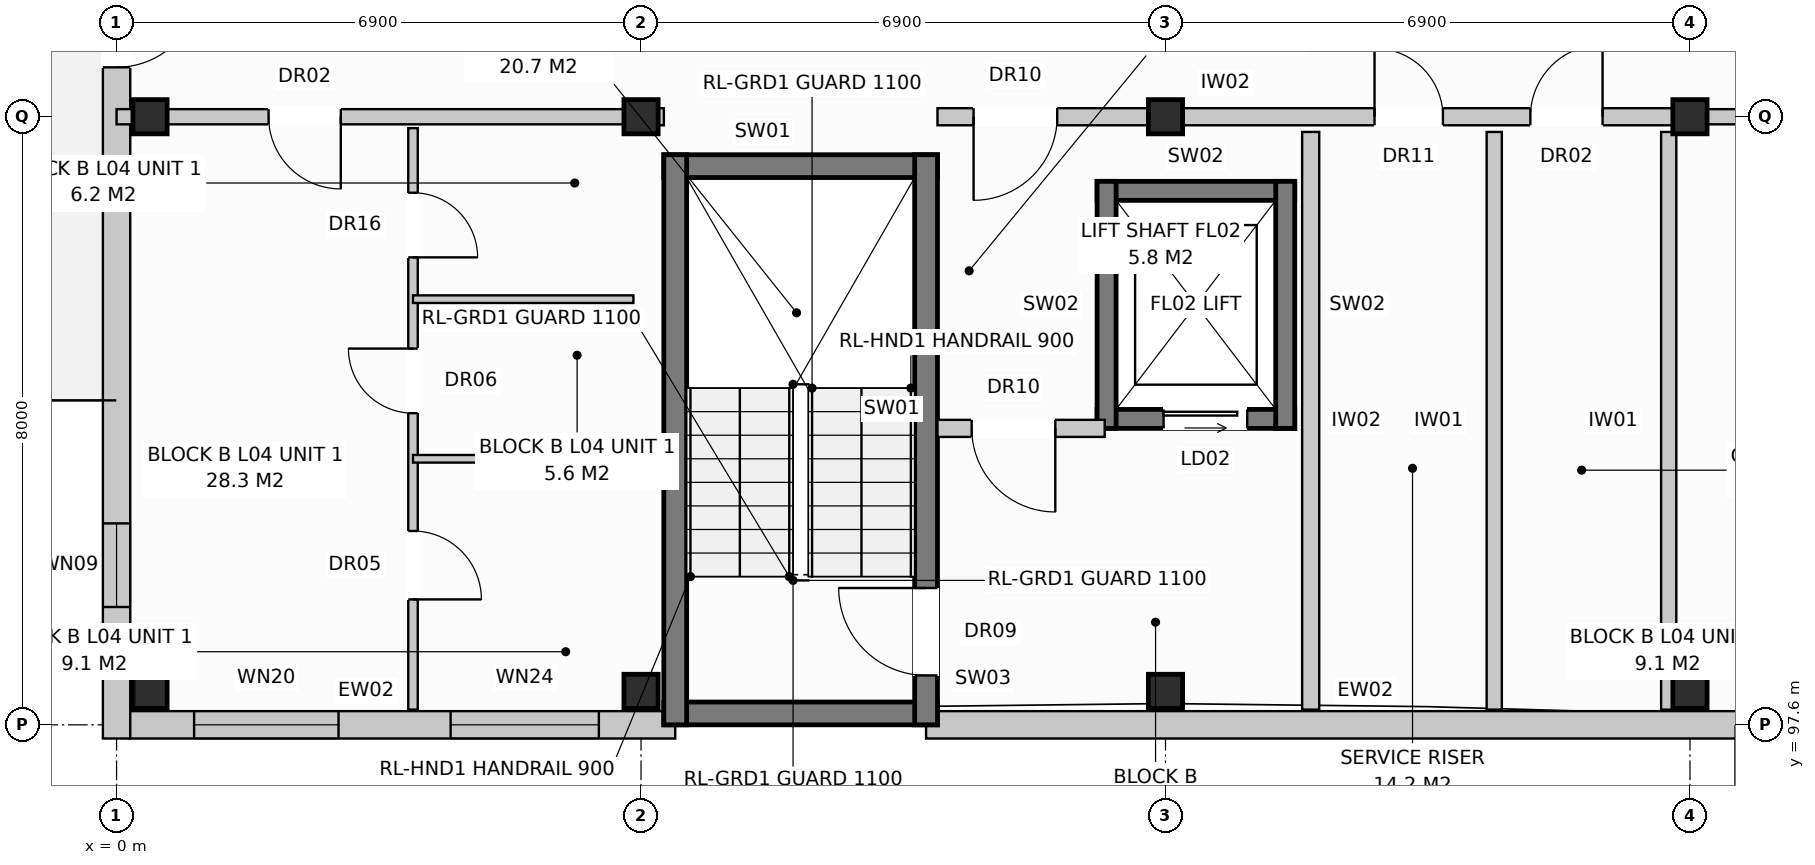
"""IFC4 building model, lengths in metres.
Left out: names, types, materials, properties, quantities, classifications, styles, units other than length and angle.
Written with IfcOpenShell. Run it as: python <this file> out.ifc"""

import sys

from ifc_helpers import new_model, si_unit, direction, frame, frame_2d, origin, origin_with_axes, origin_2d, place, context, subcontext, project, spatial, rectangle, extrude, element, fill, save


model = new_model("IFC4")
c1 = context("Model", 3, precision=1e-05, world=origin(), true_north=direction((0.0, 1.0)))
c2 = subcontext(c1, "Body", "Model", "MODEL_VIEW")
j1 = project(units=[si_unit("LENGTHUNIT", "METRE"), si_unit("PLANEANGLEUNIT", "RADIAN")], contexts=[c1])
p1 = place(None, origin())
s1 = spatial("IfcSite", under=j1, at=p1, CompositionType="ELEMENT")
p2 = place(p1, origin())
s2 = spatial("IfcBuilding", under=s1, at=p2, CompositionType="ELEMENT")
p3 = place(p2, frame((0.0, 0.0, 14.4)))
s3 = spatial("IfcBuildingStorey", under=s2, at=p3, CompositionType="ELEMENT", Elevation=14.4)
for number, where, z_axis, x_axis in (
    (1, (0.44, 98.04, 0.0), (0.0, 0.0, 1.0), (1.0, 0.0, 0.0)),
    (2, (0.44, 105.6, 0.0), (0.0, 0.0, 1.0), (1.0, 0.0, 0.0)),
    (3, (6.9, 98.04, 0.0), (0.0, 0.0, 1.0), (1.0, 0.0, 0.0)),
    (4, (6.9, 105.6, 0.0), (0.0, 0.0, 1.0), (1.0, 0.0, 0.0)),
    (5, (13.8, 98.04, 0.0), (0.0, 0.0, 1.0), (1.0, 0.0, 0.0)),
    (6, (13.8, 105.6, 0.0), (0.0, 0.0, 1.0), (1.0, 0.0, 0.0)),
    (7, (20.7, 98.04, 0.0), (0.0, 0.0, 1.0), (1.0, 0.0, 0.0)),
    (8, (20.7, 105.6, 0.0), (0.0, 0.0, 1.0), (1.0, 0.0, 0.0)),
):
    element("IfcColumn", number, at=place(p3, frame(where, z_axis=z_axis, x_axis=x_axis)), inside=s3, PredefinedType="COLUMN", context=c2, shape_type="SweptSolid", body=[
        extrude(rectangle(XDim=0.45, YDim=0.45, at=origin_2d()), origin(), (0.0, 0.0, 1.0), 3.2),
    ])
p4 = place(p3, frame((0.17, 97.6, 0.0), z_axis=(0.0, 0.0, 1.0), x_axis=(1.0, 0.0, 0.0)))
e9 = element("IfcWall", 9, at=p4, inside=s3, PredefinedType="STANDARD", context=c2, shape_type="SweptSolid", body=[
    extrude(rectangle(XDim=7.18, YDim=0.36, at=frame_2d((3.59, 0.0))), origin(), (0.0, 0.0, 1.0), 2.94),
])
p5 = place(p4, frame((0.85, 0.0, 0.8)))
e10 = element("IfcOpeningElement", 10, at=p5, cuts=e9, PredefinedType="OPENING", context=c2, shape_type="SweptSolid", body=[
    extrude(rectangle(XDim=1.9, YDim=1.85, at=frame_2d((0.95, 0.925))), frame((0.0, 0.192, 0.0), z_axis=(0.0, -1.0, 0.0), x_axis=(1.0, 0.0, 0.0)), (0.0, 0.0, 1.0), 0.384),
])
p6 = place(p4, frame((4.225, 0.0, 0.8)))
e11 = element("IfcOpeningElement", 11, at=p6, cuts=e9, PredefinedType="OPENING", context=c2, shape_type="SweptSolid", body=[
    extrude(rectangle(XDim=1.95, YDim=1.65, at=frame_2d((0.975, 0.825))), frame((0.0, 0.192, 0.0), z_axis=(0.0, -1.0, 0.0), x_axis=(1.0, 0.0, 0.0)), (0.0, 0.0, 1.0), 0.384),
])
p7 = place(p3, frame((10.65, 97.6, 0.0), z_axis=(0.0, 0.0, 1.0), x_axis=(1.0, 0.0, 0.0)))
e12 = element("IfcWall", 12, at=p7, inside=s3, PredefinedType="STANDARD", context=c2, shape_type="SweptSolid", body=[
    extrude(rectangle(XDim=17.4, YDim=0.36, at=frame_2d((8.7, 0.0))), origin(), (0.0, 0.0, 1.0), 2.94),
])
p8 = place(p7, frame((11.87, 0.0, 0.0)))
e13 = element("IfcOpeningElement", 13, at=p8, cuts=e12, PredefinedType="OPENING", context=c2, shape_type="SweptSolid", body=[
    extrude(rectangle(XDim=0.95, YDim=2.1, at=frame_2d((0.475, 1.05))), frame((0.0, 0.192, 0.0), z_axis=(0.0, -1.0, 0.0), x_axis=(1.0, 0.0, 0.0)), (0.0, 0.0, 1.0), 0.384),
])
p9 = place(p7, frame((14.87, 0.0, 0.72)))
e14 = element("IfcOpeningElement", 14, at=p9, cuts=e12, PredefinedType="OPENING", context=c2, shape_type="SweptSolid", body=[
    extrude(rectangle(XDim=1.1, YDim=1.5, at=frame_2d((0.55, 0.75))), frame((0.0, 0.192, 0.0), z_axis=(0.0, -1.0, 0.0), x_axis=(1.0, 0.0, 0.0)), (0.0, 0.0, 1.0), 0.384),
])
p10 = place(p3, frame((0.0, 97.42, 0.0), z_axis=(0.0, 0.0, 1.0), x_axis=(0.0, 1.0, 0.0)))
e15 = element("IfcWall", 15, at=p10, inside=s3, PredefinedType="STANDARD", context=c2, shape_type="SweptSolid", body=[
    extrude(rectangle(XDim=18.76, YDim=0.36, at=frame_2d((9.38, 0.0))), origin(), (0.0, 0.0, 1.0), 2.94),
])
p11 = place(p10, frame((8.83, 0.0, 0.0)))
e16 = element("IfcOpeningElement", 16, at=p11, cuts=e15, PredefinedType="OPENING", context=c2, shape_type="SweptSolid", body=[
    extrude(rectangle(XDim=1.1, YDim=2.1, at=frame_2d((0.55, 1.05))), frame((0.0, 0.192, 0.0), z_axis=(0.0, -1.0, 0.0), x_axis=(1.0, 0.0, 0.0)), (0.0, 0.0, 1.0), 0.384),
])
p12 = place(p10, frame((1.73, 0.0, 0.72)))
e17 = element("IfcOpeningElement", 17, at=p12, cuts=e15, PredefinedType="OPENING", context=c2, shape_type="SweptSolid", body=[
    extrude(rectangle(XDim=1.1, YDim=1.5, at=frame_2d((0.55, 0.75))), frame((0.0, 0.192, 0.0), z_axis=(0.0, -1.0, 0.0), x_axis=(1.0, 0.0, 0.0)), (0.0, 0.0, 1.0), 0.384),
])
p13 = place(p10, frame((15.93, 0.0, 0.72)))
e18 = element("IfcOpeningElement", 18, at=p13, cuts=e15, PredefinedType="OPENING", context=c2, shape_type="SweptSolid", body=[
    extrude(rectangle(XDim=1.1, YDim=1.5, at=frame_2d((0.55, 0.75))), frame((0.0, 0.192, 0.0), z_axis=(0.0, -1.0, 0.0), x_axis=(1.0, 0.0, 0.0)), (0.0, 0.0, 1.0), 0.384),
])
for number, where, z_axis, x_axis in (
    (19, (7.2, 97.75, 0.0), (0.0, 0.0, 1.0), (1.0, 0.0, 0.0)),
    (20, (7.2, 104.95, 0.0), (0.0, 0.0, 1.0), (1.0, 0.0, 0.0)),
):
    element("IfcWall", number, at=place(p3, frame(where, z_axis=z_axis, x_axis=x_axis)), inside=s3, PredefinedType="SHEAR", context=c2, shape_type="SweptSolid", body=[
        extrude(rectangle(XDim=3.6, YDim=0.3, at=frame_2d((1.8, 0.0))), origin(), (0.0, 0.0, 1.0), 2.94),
    ])
p14 = place(p3, frame((7.35, 97.6, 0.0), z_axis=(0.0, 0.0, 1.0), x_axis=(0.0, 1.0, 0.0)))
e21 = element("IfcWall", 21, at=p14, inside=s3, PredefinedType="SHEAR", context=c2, shape_type="SweptSolid", body=[
    extrude(rectangle(XDim=7.5, YDim=0.3, at=frame_2d((3.75, 0.0))), origin(), (0.0, 0.0, 1.0), 2.94),
])
p15 = place(p3, frame((10.65, 97.6, 0.0), z_axis=(0.0, 0.0, 1.0), x_axis=(0.0, 1.0, 0.0)))
e22 = element("IfcWall", 22, at=p15, inside=s3, PredefinedType="SHEAR", context=c2, shape_type="SweptSolid", body=[
    extrude(rectangle(XDim=7.5, YDim=0.3, at=frame_2d((3.75, 0.0))), origin(), (0.0, 0.0, 1.0), 2.94),
])
p16 = place(p15, frame((0.65, 0.0, 0.0)))
e23 = element("IfcOpeningElement", 23, at=p16, cuts=e22, PredefinedType="OPENING", context=c2, shape_type="SweptSolid", body=[
    extrude(rectangle(XDim=1.15, YDim=2.15, at=frame_2d((0.575, 1.075))), frame((0.0, 0.162, 0.0), z_axis=(0.0, -1.0, 0.0), x_axis=(1.0, 0.0, 0.0)), (0.0, 0.0, 1.0), 0.324),
])
p17 = place(p3, frame((12.9, 101.625, 0.0), z_axis=(0.0, 0.0, 1.0), x_axis=(1.0, 0.0, 0.0)))
e24 = element("IfcWall", 24, at=p17, inside=s3, PredefinedType="SHEAR", context=c2, shape_type="SweptSolid", body=[
    extrude(rectangle(XDim=2.6, YDim=0.25, at=frame_2d((1.3, 0.0))), origin(), (0.0, 0.0, 1.0), 2.94),
])
p18 = place(p17, frame((0.875, 0.0, 0.0)))
e25 = element("IfcOpeningElement", 25, at=p18, cuts=e24, PredefinedType="OPENING", context=c2, shape_type="SweptSolid", body=[
    extrude(rectangle(XDim=1.1, YDim=2.1, at=frame_2d((0.55, 1.05))), frame((0.0, 0.137, 0.0), z_axis=(0.0, -1.0, 0.0), x_axis=(1.0, 0.0, 0.0)), (0.0, 0.0, 1.0), 0.274),
])
p19 = place(p3, frame((12.9, 104.625, 0.0), z_axis=(0.0, 0.0, 1.0), x_axis=(1.0, 0.0, 0.0)))
e26 = element("IfcWall", 26, at=p19, inside=s3, PredefinedType="SHEAR", context=c2, shape_type="SweptSolid", body=[
    extrude(rectangle(XDim=2.6, YDim=0.25, at=frame_2d((1.3, 0.0))), origin(), (0.0, 0.0, 1.0), 2.94),
])
for number, where, z_axis, x_axis in (
    (27, (13.025, 101.5, 0.0), (0.0, 0.0, 1.0), (0.0, 1.0, 0.0)),
    (28, (15.375, 101.5, 0.0), (0.0, 0.0, 1.0), (0.0, 1.0, 0.0)),
):
    element("IfcWall", number, at=place(p3, frame(where, z_axis=z_axis, x_axis=x_axis)), inside=s3, PredefinedType="SHEAR", context=c2, shape_type="SweptSolid", body=[
        extrude(rectangle(XDim=3.25, YDim=0.25, at=frame_2d((1.625, 0.0))), origin(), (0.0, 0.0, 1.0), 2.94),
    ])
p20 = place(p3, frame((15.71, 97.8, 0.0), z_axis=(0.0, 0.0, 1.0), x_axis=(0.0, 1.0, 0.0)))
e29 = element("IfcWall", 29, at=p20, inside=s3, PredefinedType="PARTITIONING", context=c2, shape_type="SweptSolid", body=[
    extrude(rectangle(XDim=7.6, YDim=0.225, at=frame_2d((3.8, 0.0))), origin(), (0.0, 0.0, 1.0), 2.59),
])
p21 = place(p3, frame((10.8, 101.5, 0.0), z_axis=(0.0, 0.0, 1.0), x_axis=(1.0, 0.0, 0.0)))
e30 = element("IfcWall", 30, at=p21, inside=s3, PredefinedType="PARTITIONING", context=c2, shape_type="SweptSolid", body=[
    extrude(rectangle(XDim=2.2, YDim=0.225, at=frame_2d((1.1, 0.0))), origin(), (0.0, 0.0, 1.0), 2.94),
])
p22 = place(p21, frame((0.45, 0.0, 0.0)))
e31 = element("IfcOpeningElement", 31, at=p22, cuts=e30, PredefinedType="OPENING", context=c2, shape_type="SweptSolid", body=[
    extrude(rectangle(XDim=1.1, YDim=2.15, at=frame_2d((0.55, 1.075))), frame((0.0, 0.125, 0.0), z_axis=(0.0, -1.0, 0.0), x_axis=(1.0, 0.0, 0.0)), (0.0, 0.0, 1.0), 0.249),
])
p23 = place(p3, frame((6.9, 105.6, 0.0), z_axis=(0.0, 0.0, 1.0), x_axis=(1.0, 0.0, 0.0)))
e32 = element("IfcWall", 32, at=p23, inside=s3, PredefinedType="PARTITIONING", context=c2, shape_type="SweptSolid", body=[
    extrude(rectangle(XDim=0.3, YDim=0.225, at=frame_2d((0.15, 0.0))), origin(), (0.0, 0.0, 1.0), 2.94),
])
for number, where, z_axis, x_axis in (
    (33, (18.125, 97.8, 0.0), (0.0, 0.0, 1.0), (0.0, 1.0, 0.0)),
    (34, (20.42, 97.8, 0.0), (0.0, 0.0, 1.0), (0.0, 1.0, 0.0)),
):
    element("IfcWall", number, at=place(p3, frame(where, z_axis=z_axis, x_axis=x_axis)), inside=s3, PredefinedType="PARTITIONING", context=c2, shape_type="SweptSolid", body=[
        extrude(rectangle(XDim=7.6, YDim=0.2, at=frame_2d((3.8, 0.0))), origin(), (0.0, 0.0, 1.0), 2.94),
    ])
p24 = place(p3, frame((10.8, 105.6, 0.0), z_axis=(0.0, 0.0, 1.0), x_axis=(1.0, 0.0, 0.0)))
e35 = element("IfcWall", 35, at=p24, inside=s3, PredefinedType="PARTITIONING", context=c2, shape_type="SweptSolid", body=[
    extrude(rectangle(XDim=9.9, YDim=0.225, at=frame_2d((4.95, 0.0))), origin(), (0.0, 0.0, 1.0), 2.38),
])
p25 = place(p24, frame((0.475, 0.0, 0.0)))
e36 = element("IfcOpeningElement", 36, at=p25, cuts=e35, PredefinedType="OPENING", context=c2, shape_type="SweptSolid", body=[
    extrude(rectangle(XDim=1.1, YDim=2.15, at=frame_2d((0.55, 1.075))), frame((0.0, 0.125, 0.0), z_axis=(0.0, -1.0, 0.0), x_axis=(1.0, 0.0, 0.0)), (0.0, 0.0, 1.0), 0.249),
])
p26 = place(p24, frame((5.75, 0.0, 0.0)))
e37 = element("IfcOpeningElement", 37, at=p26, cuts=e35, PredefinedType="OPENING", context=c2, shape_type="SweptSolid", body=[
    extrude(rectangle(XDim=0.9, YDim=2.1, at=frame_2d((0.45, 1.05))), frame((0.0, 0.125, 0.0), z_axis=(0.0, -1.0, 0.0), x_axis=(1.0, 0.0, 0.0)), (0.0, 0.0, 1.0), 0.249),
])
p27 = place(p24, frame((7.8, 0.0, 0.0)))
e38 = element("IfcOpeningElement", 38, at=p27, cuts=e35, PredefinedType="OPENING", context=c2, shape_type="SweptSolid", body=[
    extrude(rectangle(XDim=0.95, YDim=2.15, at=frame_2d((0.475, 1.075))), frame((0.0, 0.125, 0.0), z_axis=(0.0, -1.0, 0.0), x_axis=(1.0, 0.0, 0.0)), (0.0, 0.0, 1.0), 0.249),
])
p28 = place(p3, frame((0.0, 105.6, 0.0), z_axis=(0.0, 0.0, 1.0), x_axis=(1.0, 0.0, 0.0)))
e39 = element("IfcWall", 39, at=p28, inside=s3, PredefinedType="PARTITIONING", context=c2, shape_type="SweptSolid", body=[
    extrude(rectangle(XDim=6.9, YDim=0.2, at=frame_2d((3.45, 0.0))), origin(), (0.0, 0.0, 1.0), 2.38),
])
p29 = place(p28, frame((2.0, 0.0, 0.0)))
e40 = element("IfcOpeningElement", 40, at=p29, cuts=e39, PredefinedType="OPENING", context=c2, shape_type="SweptSolid", body=[
    extrude(rectangle(XDim=0.95, YDim=2.15, at=frame_2d((0.475, 1.075))), frame((0.0, 0.112, 0.0), z_axis=(0.0, -1.0, 0.0), x_axis=(1.0, 0.0, 0.0)), (0.0, 0.0, 1.0), 0.224),
])
p30 = place(p3, frame((3.9, 105.45, 0.0), z_axis=(0.0, 0.0, 1.0), x_axis=(0.0, -1.0, 0.0)))
e41 = element("IfcWall", 41, at=p30, inside=s3, PredefinedType="PARTITIONING", context=c2, shape_type="SweptSolid", body=[
    extrude(rectangle(XDim=7.65, YDim=0.125, at=frame_2d((3.825, 0.0))), origin(), (0.0, 0.0, 1.0), 2.94),
])
p31 = place(p30, frame((0.85, 0.0, 0.0)))
e42 = element("IfcOpeningElement", 42, at=p31, cuts=e41, PredefinedType="OPENING", context=c2, shape_type="SweptSolid", body=[
    extrude(rectangle(XDim=0.85, YDim=2.1, at=frame_2d((0.425, 1.05))), frame((0.0, 0.074, 0.0), z_axis=(0.0, -1.0, 0.0), x_axis=(1.0, 0.0, 0.0)), (0.0, 0.0, 1.0), 0.149),
])
p32 = place(p30, frame((2.9, 0.0, 0.0)))
e43 = element("IfcOpeningElement", 43, at=p32, cuts=e41, PredefinedType="OPENING", context=c2, shape_type="SweptSolid", body=[
    extrude(rectangle(XDim=0.85, YDim=2.05, at=frame_2d((0.425, 1.025))), frame((0.0, 0.074, 0.0), z_axis=(0.0, -1.0, 0.0), x_axis=(1.0, 0.0, 0.0)), (0.0, 0.0, 1.0), 0.149),
])
p33 = place(p30, frame((5.3, 0.0, 0.0)))
e44 = element("IfcOpeningElement", 44, at=p33, cuts=e41, PredefinedType="OPENING", context=c2, shape_type="SweptSolid", body=[
    extrude(rectangle(XDim=0.9, YDim=2.1, at=frame_2d((0.45, 1.05))), frame((0.0, 0.074, 0.0), z_axis=(0.0, -1.0, 0.0), x_axis=(1.0, 0.0, 0.0)), (0.0, 0.0, 1.0), 0.149),
])
for number, where, z_axis, x_axis in (
    (45, (3.9, 103.2, 0.0), (0.0, 0.0, 1.0), (1.0, 0.0, 0.0)),
    (46, (3.9, 101.1, 0.0), (0.0, 0.0, 1.0), (1.0, 0.0, 0.0)),
):
    element("IfcWall", number, at=place(p3, frame(where, z_axis=z_axis, x_axis=x_axis)), inside=s3, PredefinedType="PARTITIONING", context=c2, shape_type="SweptSolid", body=[
        extrude(rectangle(XDim=2.9, YDim=0.1, at=frame_2d((1.45, 0.0))), origin(), (0.0, 0.0, 1.0), 2.94),
    ])
p34 = place(p3, frame((20.7, 105.6, 0.0), z_axis=(0.0, 0.0, 1.0), x_axis=(1.0, 0.0, 0.0)))
e47 = element("IfcWall", 47, at=p34, inside=s3, PredefinedType="PARTITIONING", context=c2, shape_type="SweptSolid", body=[
    extrude(rectangle(XDim=6.9, YDim=0.2, at=frame_2d((3.45, 0.0))), origin(), (0.0, 0.0, 1.0), 2.38),
])
p35 = place(p34, frame((2.0, 0.0, 0.0)))
e48 = element("IfcOpeningElement", 48, at=p35, cuts=e47, PredefinedType="OPENING", context=c2, shape_type="SweptSolid", body=[
    extrude(rectangle(XDim=0.95, YDim=2.15, at=frame_2d((0.475, 1.075))), frame((0.0, 0.112, 0.0), z_axis=(0.0, -1.0, 0.0), x_axis=(1.0, 0.0, 0.0)), (0.0, 0.0, 1.0), 0.224),
])
p36 = place(p5, origin_with_axes())
e49 = element("IfcWindow", 49, at=p36, inside=s3, PartitioningType="SINGLE_PANEL", PredefinedType="WINDOW", context=c2, shape_type="SweptSolid", body=[
    extrude(rectangle(XDim=1.9, YDim=1.85, at=frame_2d((0.95, 0.925))), frame((0.0, 0.03, 0.0), z_axis=(0.0, -1.0, 0.0), x_axis=(1.0, 0.0, 0.0)), (0.0, 0.0, 1.0), 0.06),
])
fill(e10, e49)
p37 = place(p6, origin_with_axes())
e50 = element("IfcWindow", 50, at=p37, inside=s3, PartitioningType="SINGLE_PANEL", PredefinedType="WINDOW", context=c2, shape_type="SweptSolid", body=[
    extrude(rectangle(XDim=1.95, YDim=1.65, at=frame_2d((0.975, 0.825))), frame((0.0, 0.03, 0.0), z_axis=(0.0, -1.0, 0.0), x_axis=(1.0, 0.0, 0.0)), (0.0, 0.0, 1.0), 0.06),
])
fill(e11, e50)
p38 = place(p11, frame((1.1, 0.0, 0.0), z_axis=(0.0, 0.0, 1.0), x_axis=(-1.0, 0.0, 0.0)))
e51 = element("IfcDoor", 51, at=p38, inside=s3, OperationType="SINGLE_SWING_RIGHT", PredefinedType="DOOR", context=c2, shape_type="SweptSolid", body=[
    extrude(rectangle(XDim=1.1, YDim=2.1, at=frame_2d((0.55, 1.05))), frame((0.0, 0.025, 0.0), z_axis=(0.0, -1.0, 0.0), x_axis=(1.0, 0.0, 0.0)), (0.0, 0.0, 1.0), 0.05),
])
fill(e16, e51)
p39 = place(p12, origin_with_axes())
e52 = element("IfcWindow", 52, at=p39, inside=s3, PartitioningType="SINGLE_PANEL", PredefinedType="WINDOW", context=c2, shape_type="SweptSolid", body=[
    extrude(rectangle(XDim=1.1, YDim=1.5, at=frame_2d((0.55, 0.75))), frame((0.0, 0.03, 0.0), z_axis=(0.0, -1.0, 0.0), x_axis=(1.0, 0.0, 0.0)), (0.0, 0.0, 1.0), 0.06),
])
fill(e17, e52)
p40 = place(p16, origin_with_axes())
e53 = element("IfcDoor", 53, at=p40, inside=s3, OperationType="SINGLE_SWING_RIGHT", PredefinedType="DOOR", context=c2, shape_type="SweptSolid", body=[
    extrude(rectangle(XDim=1.15, YDim=2.15, at=frame_2d((0.575, 1.075))), frame((0.0, 0.025, 0.0), z_axis=(0.0, -1.0, 0.0), x_axis=(1.0, 0.0, 0.0)), (0.0, 0.0, 1.0), 0.05),
])
fill(e23, e53)
p41 = place(p18, origin_with_axes())
e54 = element("IfcDoor", 54, at=p41, inside=s3, OperationType="SLIDING_TO_LEFT", PredefinedType="DOOR", context=c2, shape_type="SweptSolid", body=[
    extrude(rectangle(XDim=1.1, YDim=2.1, at=frame_2d((0.55, 1.05))), frame((0.0, 0.025, 0.0), z_axis=(0.0, -1.0, 0.0), x_axis=(1.0, 0.0, 0.0)), (0.0, 0.0, 1.0), 0.05),
])
fill(e25, e54)
p42 = place(p22, frame((1.1, 0.0, 0.0), z_axis=(0.0, 0.0, 1.0), x_axis=(-1.0, 0.0, 0.0)))
e55 = element("IfcDoor", 55, at=p42, inside=s3, OperationType="SINGLE_SWING_RIGHT", PredefinedType="DOOR", context=c2, shape_type="SweptSolid", body=[
    extrude(rectangle(XDim=1.1, YDim=2.15, at=frame_2d((0.55, 1.075))), frame((0.0, 0.025, 0.0), z_axis=(0.0, -1.0, 0.0), x_axis=(1.0, 0.0, 0.0)), (0.0, 0.0, 1.0), 0.05),
])
fill(e31, e55)
p43 = place(p25, frame((1.1, 0.0, 0.0), z_axis=(0.0, 0.0, 1.0), x_axis=(-1.0, 0.0, 0.0)))
e56 = element("IfcDoor", 56, at=p43, inside=s3, OperationType="SINGLE_SWING_LEFT", PredefinedType="DOOR", context=c2, shape_type="SweptSolid", body=[
    extrude(rectangle(XDim=1.1, YDim=2.15, at=frame_2d((0.55, 1.075))), frame((0.0, 0.025, 0.0), z_axis=(0.0, -1.0, 0.0), x_axis=(1.0, 0.0, 0.0)), (0.0, 0.0, 1.0), 0.05),
])
fill(e36, e56)
p44 = place(p26, origin_with_axes())
e57 = element("IfcDoor", 57, at=p44, inside=s3, OperationType="SINGLE_SWING_LEFT", PredefinedType="DOOR", context=c2, shape_type="SweptSolid", body=[
    extrude(rectangle(XDim=0.9, YDim=2.1, at=frame_2d((0.45, 1.05))), frame((0.0, 0.025, 0.0), z_axis=(0.0, -1.0, 0.0), x_axis=(1.0, 0.0, 0.0)), (0.0, 0.0, 1.0), 0.05),
])
fill(e37, e57)
p45 = place(p27, origin_with_axes())
e58 = element("IfcDoor", 58, at=p45, inside=s3, OperationType="SINGLE_SWING_RIGHT", PredefinedType="DOOR", context=c2, shape_type="SweptSolid", body=[
    extrude(rectangle(XDim=0.95, YDim=2.15, at=frame_2d((0.475, 1.075))), frame((0.0, 0.025, 0.0), z_axis=(0.0, -1.0, 0.0), x_axis=(1.0, 0.0, 0.0)), (0.0, 0.0, 1.0), 0.05),
])
fill(e38, e58)
p46 = place(p29, frame((0.95, 0.0, 0.0), z_axis=(0.0, 0.0, 1.0), x_axis=(-1.0, 0.0, 0.0)))
e59 = element("IfcDoor", 59, at=p46, inside=s3, OperationType="SINGLE_SWING_RIGHT", PredefinedType="DOOR", context=c2, shape_type="SweptSolid", body=[
    extrude(rectangle(XDim=0.95, YDim=2.15, at=frame_2d((0.475, 1.075))), frame((0.0, 0.025, 0.0), z_axis=(0.0, -1.0, 0.0), x_axis=(1.0, 0.0, 0.0)), (0.0, 0.0, 1.0), 0.05),
])
fill(e40, e59)
p47 = place(p31, origin_with_axes())
e60 = element("IfcDoor", 60, at=p47, inside=s3, OperationType="SINGLE_SWING_RIGHT", PredefinedType="DOOR", context=c2, shape_type="SweptSolid", body=[
    extrude(rectangle(XDim=0.85, YDim=2.1, at=frame_2d((0.425, 1.05))), frame((0.0, 0.025, 0.0), z_axis=(0.0, -1.0, 0.0), x_axis=(1.0, 0.0, 0.0)), (0.0, 0.0, 1.0), 0.05),
])
fill(e42, e60)
p48 = place(p32, frame((0.85, 0.0, 0.0), z_axis=(0.0, 0.0, 1.0), x_axis=(-1.0, 0.0, 0.0)))
e61 = element("IfcDoor", 61, at=p48, inside=s3, OperationType="SINGLE_SWING_LEFT", PredefinedType="DOOR", context=c2, shape_type="SweptSolid", body=[
    extrude(rectangle(XDim=0.85, YDim=2.05, at=frame_2d((0.425, 1.025))), frame((0.0, 0.025, 0.0), z_axis=(0.0, -1.0, 0.0), x_axis=(1.0, 0.0, 0.0)), (0.0, 0.0, 1.0), 0.05),
])
fill(e43, e61)
p49 = place(p33, origin_with_axes())
e62 = element("IfcDoor", 62, at=p49, inside=s3, OperationType="SINGLE_SWING_RIGHT", PredefinedType="DOOR", context=c2, shape_type="SweptSolid", body=[
    extrude(rectangle(XDim=0.9, YDim=2.1, at=frame_2d((0.45, 1.05))), frame((0.0, 0.025, 0.0), z_axis=(0.0, -1.0, 0.0), x_axis=(1.0, 0.0, 0.0)), (0.0, 0.0, 1.0), 0.05),
])
fill(e44, e62)
save(model, sys.argv[1])
